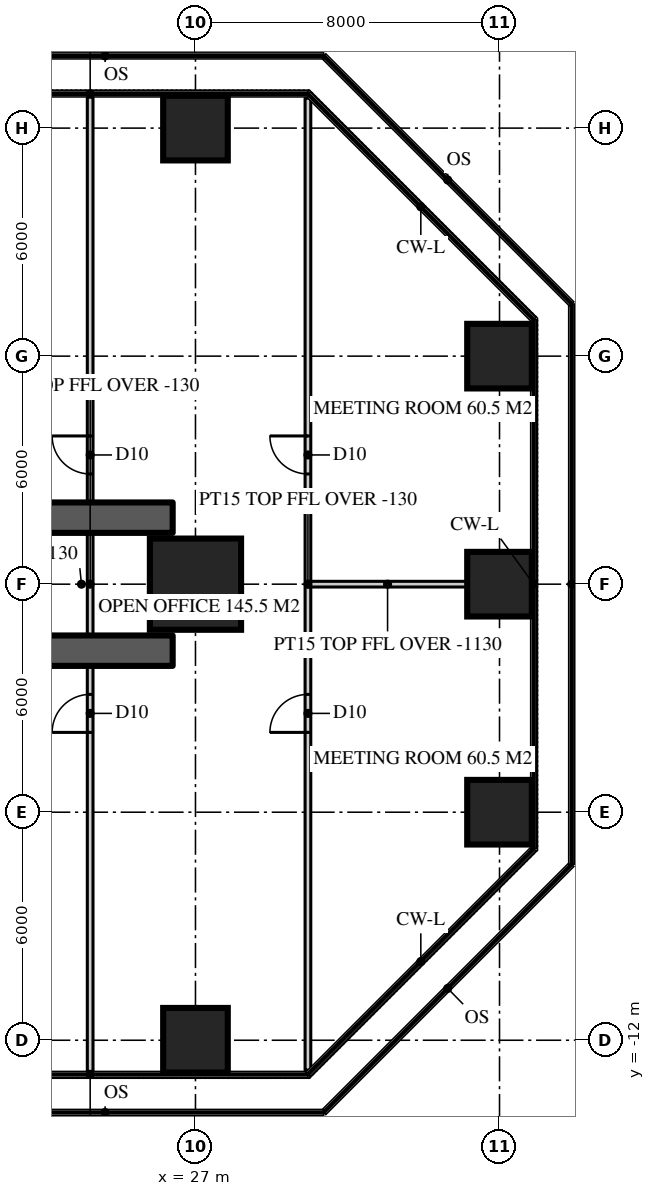
"""IFC4 building model, lengths in metres.
Left out: names, types, materials, properties, quantities, classifications, styles, units other than length and angle.
Written with IfcOpenShell. Run it as: python <this file> out.ifc"""

import sys

from ifc_helpers import new_model, si_unit, direction, frame, frame_2d, origin, origin_2d, place, context, subcontext, project, spatial, rectangle, extrude, element, fill, save


model = new_model("IFC4")
c1 = context("Model", 3, precision=1e-05, world=origin(), true_north=direction((0.0, 1.0)))
c2 = subcontext(c1, "Body", "Model", "MODEL_VIEW")
j1 = project(units=[si_unit("LENGTHUNIT", "METRE"), si_unit("PLANEANGLEUNIT", "RADIAN")], contexts=[c1])
p1 = place(None, origin())
s1 = spatial("IfcSite", under=j1, at=p1, CompositionType="ELEMENT")
p2 = place(p1, origin())
s2 = spatial("IfcBuilding", under=s1, at=p2, CompositionType="ELEMENT")
p3 = place(p2, frame((0.0, 0.0, 74.7)))
s3 = spatial("IfcBuildingStorey", under=s2, at=p3, CompositionType="ELEMENT", Elevation=74.7)
for number, where, z_axis, x_axis in (
    (1, (11.15, -1.75, 0.0), (0.0, 0.0, 1.0), (1.0, 0.0, 0.0)),
    (2, (11.15, 1.75, 0.0), (0.0, 0.0, 1.0), (1.0, 0.0, 0.0)),
):
    element("IfcWall", number, at=place(p3, frame(where, z_axis=z_axis, x_axis=x_axis)), inside=s3, PredefinedType="SHEAR", context=c2, shape_type="SweptSolid", body=[
        extrude(rectangle(XDim=15.25, YDim=0.8, at=frame_2d((7.625, 0.0))), origin(), (0.0, 0.0, 1.0), 3.9),
    ])
for number, where, z_axis, x_axis in (
    (3, (27.0, -12.0, 0.0), (0.0, 0.0, 1.0), (1.0, 0.0, 0.0)),
    (4, (35.0, -6.0, 0.0), (0.0, 0.0, 1.0), (1.0, 0.0, 0.0)),
):
    element("IfcColumn", number, at=place(p3, frame(where, z_axis=z_axis, x_axis=x_axis)), inside=s3, PredefinedType="COLUMN", context=c2, shape_type="SweptSolid", body=[
        extrude(rectangle(XDim=1.7, YDim=1.7, at=origin_2d()), origin(), (0.0, 0.0, 1.0), 3.9),
    ])
p4 = place(p3, frame((27.0, 0.0, 0.0), z_axis=(0.0, 0.0, 1.0), x_axis=(1.0, 0.0, 0.0)))
e5 = element("IfcColumn", 5, at=p4, inside=s3, PredefinedType="COLUMN", context=c2, shape_type="SweptSolid", body=[
    extrude(rectangle(XDim=2.4, YDim=2.4, at=origin_2d()), origin(), (0.0, 0.0, 1.0), 3.9),
])
for number, where, z_axis, x_axis in (
    (6, (35.0, 0.0, 0.0), (0.0, 0.0, 1.0), (1.0, 0.0, 0.0)),
    (7, (35.0, 6.0, 0.0), (0.0, 0.0, 1.0), (1.0, 0.0, 0.0)),
    (8, (27.0, 12.0, 0.0), (0.0, 0.0, 1.0), (1.0, 0.0, 0.0)),
):
    element("IfcColumn", number, at=place(p3, frame(where, z_axis=z_axis, x_axis=x_axis)), inside=s3, PredefinedType="COLUMN", context=c2, shape_type="SweptSolid", body=[
        extrude(rectangle(XDim=1.7, YDim=1.7, at=origin_2d()), origin(), (0.0, 0.0, 1.0), 3.9),
    ])
p5 = place(p3, frame((24.229, -12.82, 0.0), z_axis=(0.0, 0.0, 1.0), x_axis=(0.0, 1.0, 0.0)))
e9 = element("IfcWall", 9, at=p5, inside=s3, PredefinedType="PARTITIONING", context=c2, shape_type="SweptSolid", body=[
    extrude(rectangle(XDim=25.64, YDim=0.15, at=frame_2d((12.82, 0.0))), origin(), (0.0, 0.0, 1.0), 3.77),
])
p6 = place(p5, frame((15.72, 0.0, 0.0)))
e10 = element("IfcOpeningElement", 10, at=p6, cuts=e9, PredefinedType="OPENING", context=c2, shape_type="SweptSolid", body=[
    extrude(rectangle(XDim=1.0, YDim=2.2, at=frame_2d((0.5, 1.1))), frame((0.0, 0.085, 0.0), z_axis=(0.0, -1.0, 0.0), x_axis=(1.0, 0.0, 0.0)), (0.0, 0.0, 1.0), 0.17),
])
p7 = place(p5, frame((8.92, 0.0, 0.0)))
e11 = element("IfcOpeningElement", 11, at=p7, cuts=e9, PredefinedType="OPENING", context=c2, shape_type="SweptSolid", body=[
    extrude(rectangle(XDim=1.0, YDim=2.2, at=frame_2d((0.5, 1.1))), frame((0.0, 0.085, 0.0), z_axis=(0.0, -1.0, 0.0), x_axis=(1.0, 0.0, 0.0)), (0.0, 0.0, 1.0), 0.17),
])
p8 = place(p3, frame((29.959, -12.786, 0.0), z_axis=(0.0, 0.0, 1.0), x_axis=(0.0, 1.0, 0.0)))
e12 = element("IfcWall", 12, at=p8, inside=s3, PredefinedType="PARTITIONING", context=c2, shape_type="SweptSolid", body=[
    extrude(rectangle(XDim=25.573, YDim=0.15, at=frame_2d((12.786, 0.0))), origin(), (0.0, 0.0, 1.0), 3.77),
])
p9 = place(p8, frame((15.687, 0.0, 0.0)))
e13 = element("IfcOpeningElement", 13, at=p9, cuts=e12, PredefinedType="OPENING", context=c2, shape_type="SweptSolid", body=[
    extrude(rectangle(XDim=1.0, YDim=2.2, at=frame_2d((0.5, 1.1))), frame((0.0, 0.085, 0.0), z_axis=(0.0, -1.0, 0.0), x_axis=(1.0, 0.0, 0.0)), (0.0, 0.0, 1.0), 0.17),
])
p10 = place(p8, frame((8.886, 0.0, 0.0)))
e14 = element("IfcOpeningElement", 14, at=p10, cuts=e12, PredefinedType="OPENING", context=c2, shape_type="SweptSolid", body=[
    extrude(rectangle(XDim=1.0, YDim=2.2, at=frame_2d((0.5, 1.1))), frame((0.0, 0.085, 0.0), z_axis=(0.0, -1.0, 0.0), x_axis=(1.0, 0.0, 0.0)), (0.0, 0.0, 1.0), 0.17),
])
p11 = place(p3, frame((29.959, 0.0, 0.0), z_axis=(0.0, 0.0, 1.0), x_axis=(1.0, 0.0, 0.0)))
e15 = element("IfcWall", 15, at=p11, inside=s3, PredefinedType="PARTITIONING", context=c2, shape_type="SweptSolid", body=[
    extrude(rectangle(XDim=4.191, YDim=0.15, at=frame_2d((2.095, 0.0))), origin(), (0.0, 0.0, 1.0), 2.77),
])
p12 = place(p6, origin())
e16 = element("IfcDoor", 16, at=p12, inside=s3, OperationType="SINGLE_SWING_RIGHT", PredefinedType="DOOR", context=c2, shape_type="SweptSolid", body=[
    extrude(rectangle(XDim=1.0, YDim=2.2, at=frame_2d((0.5, 1.1))), frame((0.0, 0.025, 0.0), z_axis=(0.0, -1.0, 0.0), x_axis=(1.0, 0.0, 0.0)), (0.0, 0.0, 1.0), 0.05),
])
fill(e10, e16)
p13 = place(p7, origin())
e17 = element("IfcDoor", 17, at=p13, inside=s3, OperationType="SINGLE_SWING_LEFT", PredefinedType="DOOR", context=c2, shape_type="SweptSolid", body=[
    extrude(rectangle(XDim=1.0, YDim=2.2, at=frame_2d((0.5, 1.1))), frame((0.0, 0.025, 0.0), z_axis=(0.0, -1.0, 0.0), x_axis=(1.0, 0.0, 0.0)), (0.0, 0.0, 1.0), 0.05),
])
fill(e11, e17)
p14 = place(p9, origin())
e18 = element("IfcDoor", 18, at=p14, inside=s3, OperationType="SINGLE_SWING_RIGHT", PredefinedType="DOOR", context=c2, shape_type="SweptSolid", body=[
    extrude(rectangle(XDim=1.0, YDim=2.2, at=frame_2d((0.5, 1.1))), frame((0.0, 0.025, 0.0), z_axis=(0.0, -1.0, 0.0), x_axis=(1.0, 0.0, 0.0)), (0.0, 0.0, 1.0), 0.05),
])
fill(e13, e18)
p15 = place(p10, origin())
e19 = element("IfcDoor", 19, at=p15, inside=s3, OperationType="SINGLE_SWING_LEFT", PredefinedType="DOOR", context=c2, shape_type="SweptSolid", body=[
    extrude(rectangle(XDim=1.0, YDim=2.2, at=frame_2d((0.5, 1.1))), frame((0.0, 0.025, 0.0), z_axis=(0.0, -1.0, 0.0), x_axis=(1.0, 0.0, 0.0)), (0.0, 0.0, 1.0), 0.05),
])
fill(e14, e19)
save(model, sys.argv[1])
